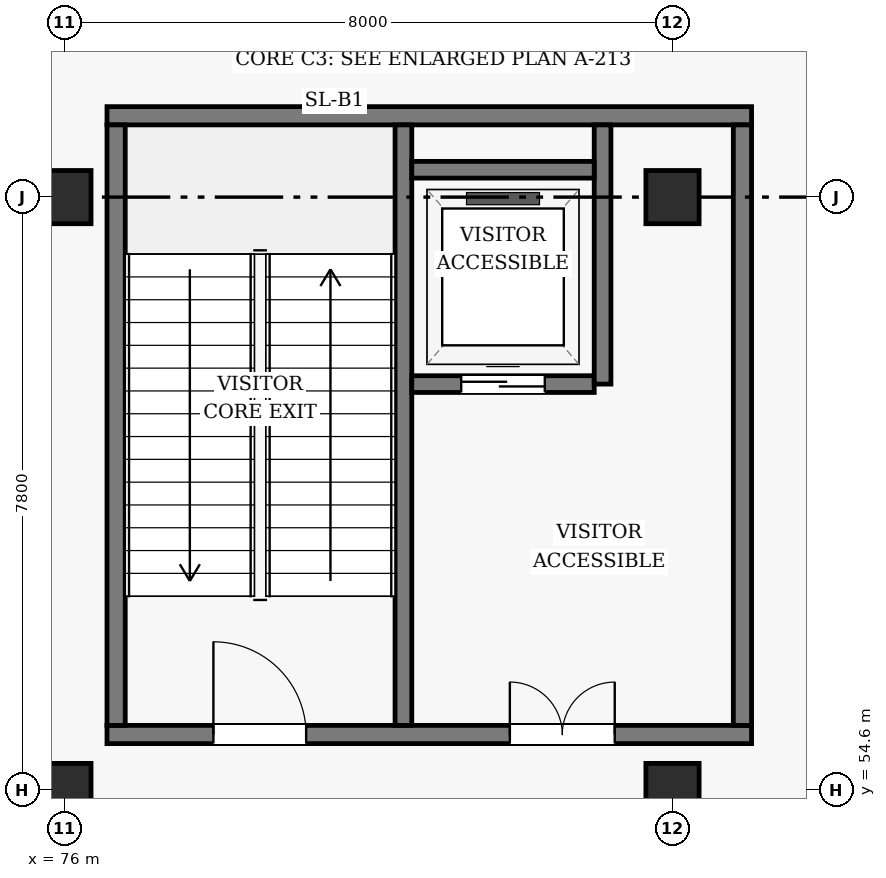
"""IFC4 building model, lengths in metres.
Left out: names, types, materials, properties, quantities, classifications, styles, units other than length and angle.
Written with IfcOpenShell. Run it as: python <this file> out.ifc"""

import sys

from ifc_helpers import new_model, si_unit, direction, frame, frame_2d, origin, origin_2d, place, context, subcontext, project, spatial, rectangle, extrude, element, fill, save


model = new_model("IFC4")
c1 = context("Model", 3, precision=1e-05, world=origin(), true_north=direction((0.0, 1.0)))
c2 = subcontext(c1, "Body", "Model", "MODEL_VIEW")
j1 = project(units=[si_unit("LENGTHUNIT", "METRE"), si_unit("PLANEANGLEUNIT", "RADIAN")], contexts=[c1])
p1 = place(None, origin())
s1 = spatial("IfcSite", under=j1, at=p1, CompositionType="ELEMENT")
p2 = place(p1, origin())
s2 = spatial("IfcBuilding", under=s1, at=p2, CompositionType="ELEMENT")
p3 = place(p2, frame((0.0, 0.0, -4.8)))
s3 = spatial("IfcBuildingStorey", under=s2, at=p3, CompositionType="ELEMENT", Elevation=-4.8)
for number, where, z_axis, x_axis in (
    (1, (76.0, 54.6, 0.0), (0.0, 0.0, 1.0), (1.0, 0.0, 0.0)),
    (2, (76.0, 62.4, 0.0), (0.0, 0.0, 1.0), (1.0, 0.0, 0.0)),
    (3, (84.0, 54.6, 0.0), (0.0, 0.0, 1.0), (1.0, 0.0, 0.0)),
    (4, (84.0, 62.4, 0.0), (0.0, 0.0, 1.0), (1.0, 0.0, 0.0)),
):
    element("IfcColumn", number, at=place(p3, frame(where, z_axis=z_axis, x_axis=x_axis)), inside=s3, PredefinedType="COLUMN", context=c2, shape_type="SweptSolid", body=[
        extrude(rectangle(XDim=0.7, YDim=0.7, at=origin_2d()), origin(), (0.0, 0.0, 1.0), 4.8),
    ])
p4 = place(p3, frame((76.56, 55.33, 0.0), z_axis=(0.0, 0.0, 1.0), x_axis=(1.0, 0.0, 0.0)))
e5 = element("IfcWall", 5, at=p4, inside=s3, PredefinedType="SHEAR", context=c2, shape_type="SweptSolid", body=[
    extrude(rectangle(XDim=8.48, YDim=0.24, at=frame_2d((4.24, 0.0))), origin(), (0.0, 0.0, 1.0), 4.54),
])
p5 = place(p4, frame((1.4, 0.0, 0.0)))
e6 = element("IfcOpeningElement", 6, at=p5, cuts=e5, PredefinedType="OPENING", context=c2, shape_type="SweptSolid", body=[
    extrude(rectangle(XDim=1.22, YDim=2.18, at=frame_2d((0.61, 1.09))), frame((0.0, 0.13, 0.0), z_axis=(0.0, -1.0, 0.0), x_axis=(1.0, 0.0, 0.0)), (0.0, 0.0, 1.0), 0.26),
])
p6 = place(p4, frame((5.3, 0.0, 0.0)))
e7 = element("IfcOpeningElement", 7, at=p6, cuts=e5, PredefinedType="OPENING", context=c2, shape_type="SweptSolid", body=[
    extrude(rectangle(XDim=1.38, YDim=2.15, at=frame_2d((0.69, 1.075))), frame((0.0, 0.13, 0.0), z_axis=(0.0, -1.0, 0.0), x_axis=(1.0, 0.0, 0.0)), (0.0, 0.0, 1.0), 0.26),
])
p7 = place(p3, frame((76.56, 63.47, 0.0), z_axis=(0.0, 0.0, 1.0), x_axis=(1.0, 0.0, 0.0)))
e8 = element("IfcWall", 8, at=p7, inside=s3, PredefinedType="SHEAR", context=c2, shape_type="SweptSolid", body=[
    extrude(rectangle(XDim=8.48, YDim=0.24, at=frame_2d((4.24, 0.0))), origin(), (0.0, 0.0, 1.0), 4.54),
])
p8 = place(p3, frame((76.68, 55.45, 0.0), z_axis=(0.0, 0.0, 1.0), x_axis=(0.0, 1.0, 0.0)))
e9 = element("IfcWall", 9, at=p8, inside=s3, PredefinedType="SHEAR", context=c2, shape_type="SweptSolid", body=[
    extrude(rectangle(XDim=7.9, YDim=0.24, at=frame_2d((3.95, 0.0))), origin(), (0.0, 0.0, 1.0), 4.54),
])
p9 = place(p3, frame((80.46, 55.45, 0.0), z_axis=(0.0, 0.0, 1.0), x_axis=(0.0, 1.0, 0.0)))
e10 = element("IfcWall", 10, at=p9, inside=s3, PredefinedType="SHEAR", context=c2, shape_type="SweptSolid", body=[
    extrude(rectangle(XDim=7.9, YDim=0.22, at=frame_2d((3.95, 0.0))), origin(), (0.0, 0.0, 1.0), 4.54),
])
p10 = place(p3, frame((84.92, 55.45, 0.0), z_axis=(0.0, 0.0, 1.0), x_axis=(0.0, 1.0, 0.0)))
e11 = element("IfcWall", 11, at=p10, inside=s3, PredefinedType="SHEAR", context=c2, shape_type="SweptSolid", body=[
    extrude(rectangle(XDim=7.9, YDim=0.24, at=frame_2d((3.95, 0.0))), origin(), (0.0, 0.0, 1.0), 4.54),
])
p11 = place(p3, frame((80.57, 59.94, 0.0), z_axis=(0.0, 0.0, 1.0), x_axis=(1.0, 0.0, 0.0)))
e12 = element("IfcWall", 12, at=p11, inside=s3, PredefinedType="SHEAR", context=c2, shape_type="SweptSolid", body=[
    extrude(rectangle(XDim=2.4, YDim=0.22, at=frame_2d((1.2, 0.0))), origin(), (0.0, 0.0, 1.0), 4.54),
])
p12 = place(p11, frame((0.65, 0.0, 0.0)))
e13 = element("IfcOpeningElement", 13, at=p12, cuts=e12, PredefinedType="OPENING", context=c2, shape_type="SweptSolid", body=[
    extrude(rectangle(XDim=1.1, YDim=2.15, at=frame_2d((0.55, 1.075))), frame((0.0, 0.12, 0.0), z_axis=(0.0, -1.0, 0.0), x_axis=(1.0, 0.0, 0.0)), (0.0, 0.0, 1.0), 0.24),
])
p13 = place(p3, frame((83.08, 59.94, 0.0), z_axis=(0.0, 0.0, 1.0), x_axis=(0.0, 1.0, 0.0)))
e14 = element("IfcWall", 14, at=p13, inside=s3, PredefinedType="SHEAR", context=c2, shape_type="SweptSolid", body=[
    extrude(rectangle(XDim=3.41, YDim=0.22, at=frame_2d((1.705, 0.0))), origin(), (0.0, 0.0, 1.0), 4.54),
])
p14 = place(p3, frame((80.57, 62.76, 0.0), z_axis=(0.0, 0.0, 1.0), x_axis=(1.0, 0.0, 0.0)))
e15 = element("IfcWall", 15, at=p14, inside=s3, PredefinedType="SHEAR", context=c2, shape_type="SweptSolid", body=[
    extrude(rectangle(XDim=2.4, YDim=0.22, at=frame_2d((1.2, 0.0))), origin(), (0.0, 0.0, 1.0), 4.54),
])
p15 = place(p5, origin())
e16 = element("IfcDoor", 16, at=p15, inside=s3, OperationType="SINGLE_SWING_LEFT", PredefinedType="DOOR", context=c2, shape_type="SweptSolid", body=[
    extrude(rectangle(XDim=1.22, YDim=2.18, at=frame_2d((0.61, 1.09))), frame((0.0, 0.025, 0.0), z_axis=(0.0, -1.0, 0.0), x_axis=(1.0, 0.0, 0.0)), (0.0, 0.0, 1.0), 0.05),
])
fill(e6, e16)
p16 = place(p6, frame((1.38, 0.0, 0.0), z_axis=(0.0, 0.0, 1.0), x_axis=(-1.0, 0.0, 0.0)))
e17 = element("IfcDoor", 17, at=p16, inside=s3, OperationType="DOUBLE_DOOR_SINGLE_SWING", PredefinedType="DOOR", context=c2, shape_type="SweptSolid", body=[
    extrude(rectangle(XDim=1.38, YDim=2.15, at=frame_2d((0.69, 1.075))), frame((0.0, 0.025, 0.0), z_axis=(0.0, -1.0, 0.0), x_axis=(1.0, 0.0, 0.0)), (0.0, 0.0, 1.0), 0.05),
])
fill(e7, e17)
p17 = place(p12, origin())
e18 = element("IfcDoor", 18, at=p17, inside=s3, OperationType="SLIDING_TO_LEFT", PredefinedType="DOOR", context=c2, shape_type="SweptSolid", body=[
    extrude(rectangle(XDim=1.1, YDim=2.15, at=frame_2d((0.55, 1.075))), frame((0.0, 0.025, 0.0), z_axis=(0.0, -1.0, 0.0), x_axis=(1.0, 0.0, 0.0)), (0.0, 0.0, 1.0), 0.05),
])
fill(e13, e18)
save(model, sys.argv[1])
